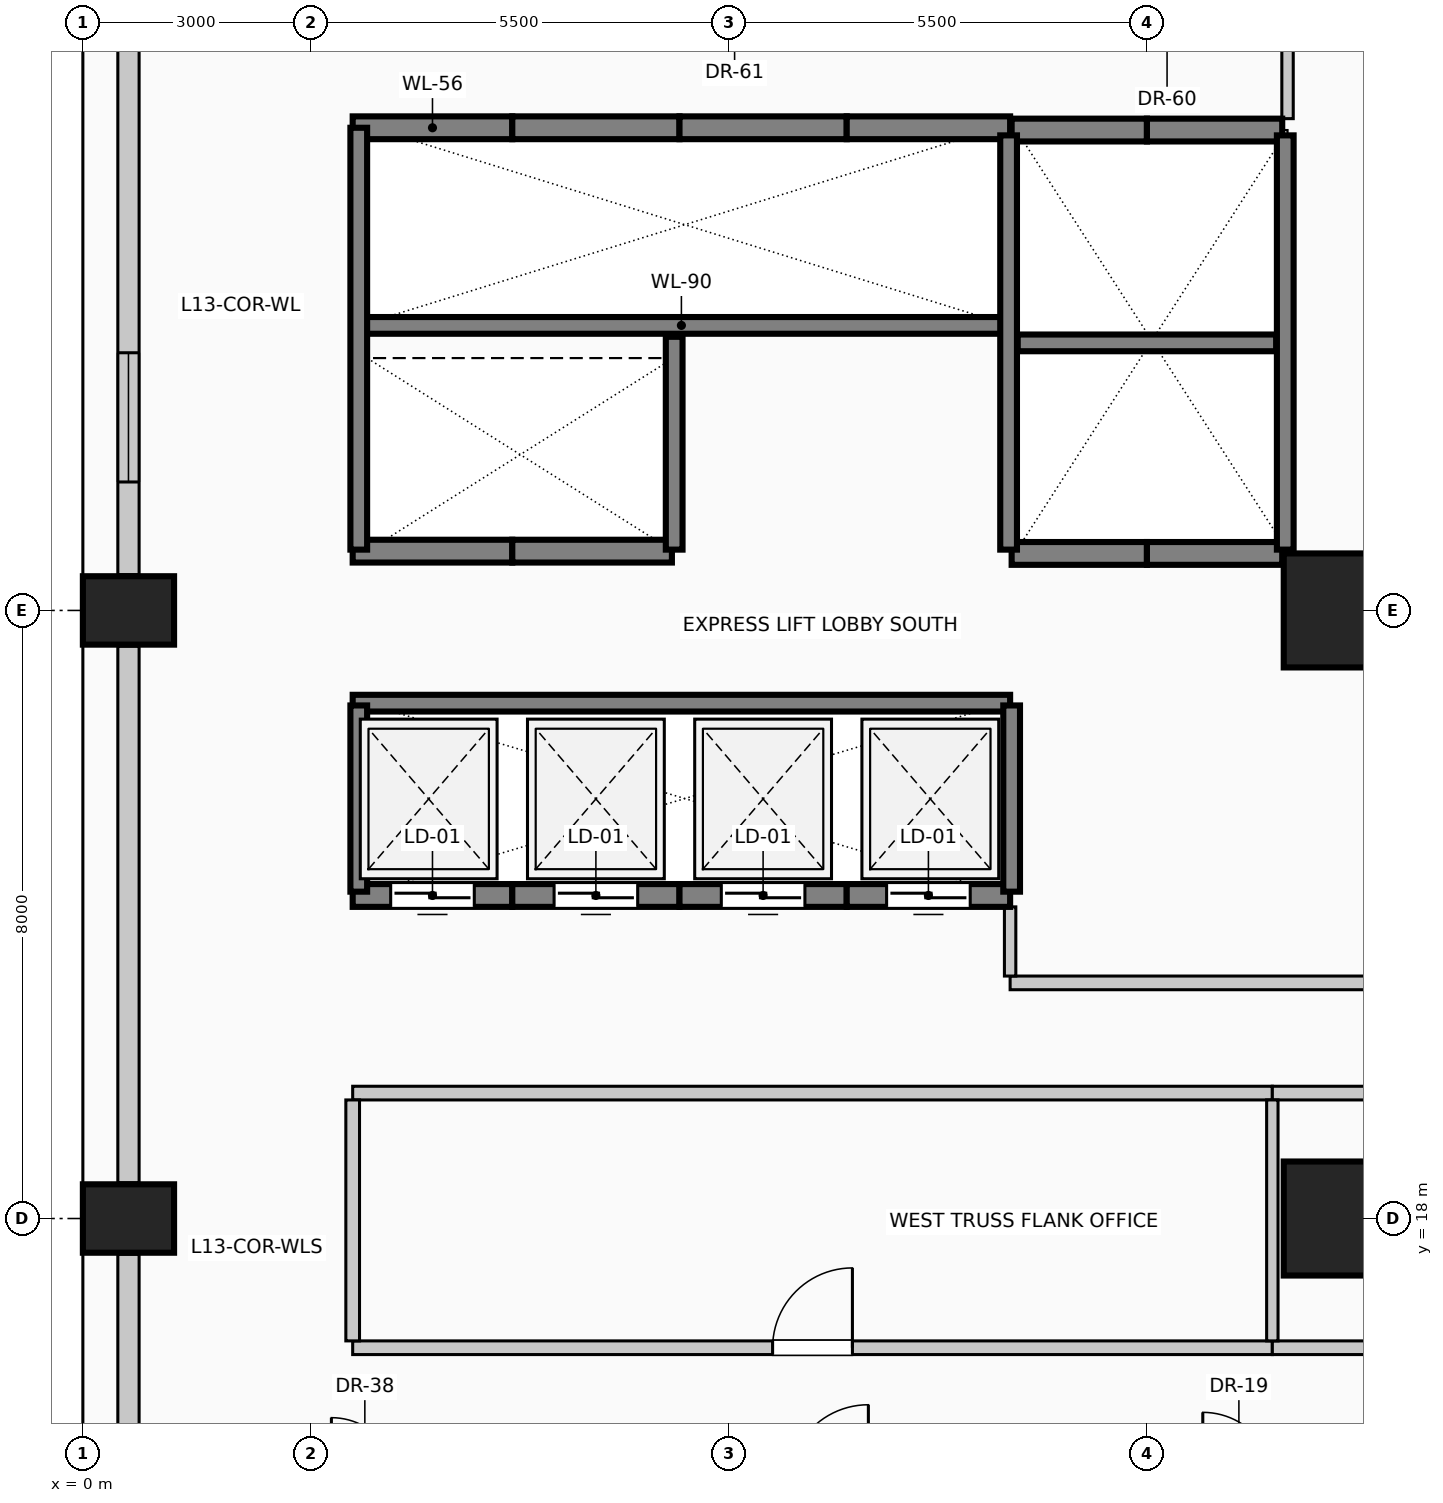
"""IFC4 building model, lengths in metres.
Left out: names, types, materials, properties, quantities, classifications, styles, units other than length and angle.
Written with IfcOpenShell. Run it as: python <this file> out.ifc"""

import sys

from ifc_helpers import new_model, si_unit, direction, frame, frame_2d, origin, origin_2d, place, context, subcontext, project, spatial, rectangle, extrude, element, fill, save


model = new_model("IFC4")
c1 = context("Model", 3, precision=1e-05, world=origin(), true_north=direction((0.0, 1.0)))
c2 = subcontext(c1, "Body", "Model", "MODEL_VIEW")
j1 = project(units=[si_unit("LENGTHUNIT", "METRE"), si_unit("PLANEANGLEUNIT", "RADIAN")], contexts=[c1])
p1 = place(None, origin())
s1 = spatial("IfcSite", under=j1, at=p1, CompositionType="ELEMENT")
p2 = place(p1, origin())
s2 = spatial("IfcBuilding", under=s1, at=p2, CompositionType="ELEMENT")
p3 = place(p2, frame((0.0, 0.0, 54.6)))
s3 = spatial("IfcBuildingStorey", under=s2, at=p3, CompositionType="ELEMENT", Elevation=54.6)
for number, where, z_axis, x_axis in (
    (1, (0.6, 18.0, 0.0), (0.0, 0.0, 1.0), (0.0, 1.0, 0.0)),
    (2, (0.6, 26.0, 0.0), (0.0, 0.0, 1.0), (0.0, 1.0, 0.0)),
):
    element("IfcColumn", number, at=place(p3, frame(where, z_axis=z_axis, x_axis=x_axis)), inside=s3, PredefinedType="COLUMN", context=c2, shape_type="SweptSolid", body=[
        extrude(rectangle(XDim=0.9, YDim=1.2, at=origin_2d()), origin(), (0.0, 0.0, 1.0), 4.0),
    ])
for number, where, z_axis, x_axis in (
    (3, (16.4, 18.0, 0.0), (0.0, 0.0, 1.0), (1.0, 0.0, 0.0)),
    (4, (16.4, 26.0, 0.0), (0.0, 0.0, 1.0), (1.0, 0.0, 0.0)),
):
    element("IfcColumn", number, at=place(p3, frame(where, z_axis=z_axis, x_axis=x_axis)), inside=s3, PredefinedType="COLUMN", context=c2, shape_type="SweptSolid", body=[
        extrude(rectangle(XDim=1.2, YDim=1.5, at=origin_2d()), origin(), (0.0, 0.0, 1.0), 4.0),
    ])
p4 = place(p3, frame((0.6, 10.47, 0.0), z_axis=(0.0, 0.0, 1.0), x_axis=(0.0, 1.0, 0.0)))
e5 = element("IfcWall", 5, at=p4, inside=s3, PredefinedType="SOLIDWALL", context=c2, shape_type="SweptSolid", body=[
    extrude(rectangle(XDim=7.06, YDim=0.28, at=frame_2d((3.53, 0.0))), origin(), (0.0, 0.0, 1.0), 2.85),
])
p5 = place(p4, frame((1.22, 0.0, 0.5)))
e6 = element("IfcOpeningElement", 6, at=p5, cuts=e5, PredefinedType="OPENING", context=c2, shape_type="SweptSolid", body=[
    extrude(rectangle(XDim=1.7, YDim=1.95, at=frame_2d((0.85, 0.975))), frame((0.0, 0.15, 0.0), z_axis=(0.0, -1.0, 0.0), x_axis=(1.0, 0.0, 0.0)), (0.0, 0.0, 1.0), 0.3),
])
p6 = place(p3, frame((0.6, 18.47, 0.0), z_axis=(0.0, 0.0, 1.0), x_axis=(0.0, 1.0, 0.0)))
e7 = element("IfcWall", 7, at=p6, inside=s3, PredefinedType="SOLIDWALL", context=c2, shape_type="SweptSolid", body=[
    extrude(rectangle(XDim=7.06, YDim=0.28, at=frame_2d((3.53, 0.0))), origin(), (0.0, 0.0, 1.0), 2.85),
])
p7 = place(p3, frame((0.6, 26.47, 0.0), z_axis=(0.0, 0.0, 1.0), x_axis=(0.0, 1.0, 0.0)))
e8 = element("IfcWall", 8, at=p7, inside=s3, PredefinedType="SOLIDWALL", context=c2, shape_type="SweptSolid", body=[
    extrude(rectangle(XDim=7.06, YDim=0.28, at=frame_2d((3.53, 0.0))), origin(), (0.0, 0.0, 1.0), 2.85),
])
p8 = place(p7, frame((1.22, 0.0, 0.5)))
e9 = element("IfcOpeningElement", 9, at=p8, cuts=e8, PredefinedType="OPENING", context=c2, shape_type="SweptSolid", body=[
    extrude(rectangle(XDim=1.7, YDim=1.95, at=frame_2d((0.85, 0.975))), frame((0.0, 0.15, 0.0), z_axis=(0.0, -1.0, 0.0), x_axis=(1.0, 0.0, 0.0)), (0.0, 0.0, 1.0), 0.3),
])
p9 = place(p3, frame((5.65, 22.25, 0.0), z_axis=(0.0, 0.0, 1.0), x_axis=(-1.0, 0.0, 0.0)))
e10 = element("IfcWall", 10, at=p9, inside=s3, PredefinedType="SOLIDWALL", context=c2, shape_type="SweptSolid", body=[
    extrude(rectangle(XDim=2.1, YDim=0.3, at=frame_2d((1.05, 0.0))), origin(), (0.0, 0.0, 1.0), 4.0),
])
p10 = place(p9, frame((0.5, 0.0, 0.0)))
e11 = element("IfcOpeningElement", 11, at=p10, cuts=e10, PredefinedType="OPENING", context=c2, shape_type="SweptSolid", body=[
    extrude(rectangle(XDim=1.1, YDim=2.2, at=frame_2d((0.55, 1.1))), frame((0.0, 0.16, 0.0), z_axis=(0.0, -1.0, 0.0), x_axis=(1.0, 0.0, 0.0)), (0.0, 0.0, 1.0), 0.32),
])
p11 = place(p3, frame((7.85, 22.25, 0.0), z_axis=(0.0, 0.0, 1.0), x_axis=(-1.0, 0.0, 0.0)))
e12 = element("IfcWall", 12, at=p11, inside=s3, PredefinedType="SOLIDWALL", context=c2, shape_type="SweptSolid", body=[
    extrude(rectangle(XDim=2.2, YDim=0.3, at=frame_2d((1.1, 0.0))), origin(), (0.0, 0.0, 1.0), 4.0),
])
p12 = place(p11, frame((0.55, 0.0, 0.0)))
e13 = element("IfcOpeningElement", 13, at=p12, cuts=e12, PredefinedType="OPENING", context=c2, shape_type="SweptSolid", body=[
    extrude(rectangle(XDim=1.1, YDim=2.2, at=frame_2d((0.55, 1.1))), frame((0.0, 0.16, 0.0), z_axis=(0.0, -1.0, 0.0), x_axis=(1.0, 0.0, 0.0)), (0.0, 0.0, 1.0), 0.32),
])
p13 = place(p3, frame((10.05, 22.25, 0.0), z_axis=(0.0, 0.0, 1.0), x_axis=(-1.0, 0.0, 0.0)))
e14 = element("IfcWall", 14, at=p13, inside=s3, PredefinedType="SOLIDWALL", context=c2, shape_type="SweptSolid", body=[
    extrude(rectangle(XDim=2.2, YDim=0.3, at=frame_2d((1.1, 0.0))), origin(), (0.0, 0.0, 1.0), 4.0),
])
p14 = place(p13, frame((0.55, 0.0, 0.0)))
e15 = element("IfcOpeningElement", 15, at=p14, cuts=e14, PredefinedType="OPENING", context=c2, shape_type="SweptSolid", body=[
    extrude(rectangle(XDim=1.1, YDim=2.2, at=frame_2d((0.55, 1.1))), frame((0.0, 0.16, 0.0), z_axis=(0.0, -1.0, 0.0), x_axis=(1.0, 0.0, 0.0)), (0.0, 0.0, 1.0), 0.32),
])
p15 = place(p3, frame((12.2, 22.25, 0.0), z_axis=(0.0, 0.0, 1.0), x_axis=(-1.0, 0.0, 0.0)))
e16 = element("IfcWall", 16, at=p15, inside=s3, PredefinedType="SOLIDWALL", context=c2, shape_type="SweptSolid", body=[
    extrude(rectangle(XDim=2.15, YDim=0.3, at=frame_2d((1.075, 0.0))), origin(), (0.0, 0.0, 1.0), 4.0),
])
p16 = place(p15, frame((0.525, 0.0, 0.0)))
e17 = element("IfcOpeningElement", 17, at=p16, cuts=e16, PredefinedType="OPENING", context=c2, shape_type="SweptSolid", body=[
    extrude(rectangle(XDim=1.1, YDim=2.2, at=frame_2d((0.55, 1.1))), frame((0.0, 0.16, 0.0), z_axis=(0.0, -1.0, 0.0), x_axis=(1.0, 0.0, 0.0)), (0.0, 0.0, 1.0), 0.32),
])
for number, where, z_axis, x_axis in (
    (18, (14.0, 26.75, 0.0), (0.0, 0.0, 1.0), (-1.0, 0.0, 0.0)),
    (19, (15.78, 26.75, 0.0), (0.0, 0.0, 1.0), (-1.0, 0.0, 0.0)),
    (20, (12.22, 32.32, 0.0), (0.0, 0.0, 1.0), (1.0, 0.0, 0.0)),
    (21, (14.0, 32.32, 0.0), (0.0, 0.0, 1.0), (1.0, 0.0, 0.0)),
):
    element("IfcWall", number, at=place(p3, frame(where, z_axis=z_axis, x_axis=x_axis)), inside=s3, PredefinedType="SOLIDWALL", context=c2, shape_type="SweptSolid", body=[
        extrude(rectangle(XDim=1.78, YDim=0.3, at=frame_2d((0.89, 0.0))), origin(), (0.0, 0.0, 1.0), 4.0),
    ])
p17 = place(p3, frame((3.55, 32.35, 0.0), z_axis=(0.0, 0.0, 1.0), x_axis=(1.0, 0.0, 0.0)))
e22 = element("IfcWall", 22, at=p17, inside=s3, PredefinedType="SOLIDWALL", context=c2, shape_type="SweptSolid", body=[
    extrude(rectangle(XDim=2.1, YDim=0.3, at=frame_2d((1.05, 0.0))), origin(), (0.0, 0.0, 1.0), 4.0),
])
p18 = place(p3, frame((5.65, 32.35, 0.0), z_axis=(0.0, 0.0, 1.0), x_axis=(1.0, 0.0, 0.0)))
e23 = element("IfcWall", 23, at=p18, inside=s3, PredefinedType="SOLIDWALL", context=c2, shape_type="SweptSolid", body=[
    extrude(rectangle(XDim=2.2, YDim=0.3, at=frame_2d((1.1, 0.0))), origin(), (0.0, 0.0, 1.0), 4.0),
])
p19 = place(p3, frame((7.85, 32.35, 0.0), z_axis=(0.0, 0.0, 1.0), x_axis=(1.0, 0.0, 0.0)))
e24 = element("IfcWall", 24, at=p19, inside=s3, PredefinedType="SOLIDWALL", context=c2, shape_type="SweptSolid", body=[
    extrude(rectangle(XDim=2.2, YDim=0.3, at=frame_2d((1.1, 0.0))), origin(), (0.0, 0.0, 1.0), 4.0),
])
p20 = place(p3, frame((10.05, 32.35, 0.0), z_axis=(0.0, 0.0, 1.0), x_axis=(1.0, 0.0, 0.0)))
e25 = element("IfcWall", 25, at=p20, inside=s3, PredefinedType="SOLIDWALL", context=c2, shape_type="SweptSolid", body=[
    extrude(rectangle(XDim=2.15, YDim=0.3, at=frame_2d((1.075, 0.0))), origin(), (0.0, 0.0, 1.0), 4.0),
])
p21 = place(p3, frame((5.65, 26.78, 0.0), z_axis=(0.0, 0.0, 1.0), x_axis=(-1.0, 0.0, 0.0)))
e26 = element("IfcWall", 26, at=p21, inside=s3, PredefinedType="SOLIDWALL", context=c2, shape_type="SweptSolid", body=[
    extrude(rectangle(XDim=2.1, YDim=0.3, at=frame_2d((1.05, 0.0))), origin(), (0.0, 0.0, 1.0), 4.0),
])
p22 = place(p3, frame((7.75, 26.78, 0.0), z_axis=(0.0, 0.0, 1.0), x_axis=(-1.0, 0.0, 0.0)))
e27 = element("IfcWall", 27, at=p22, inside=s3, PredefinedType="SOLIDWALL", context=c2, shape_type="SweptSolid", body=[
    extrude(rectangle(XDim=2.1, YDim=0.3, at=frame_2d((1.05, 0.0))), origin(), (0.0, 0.0, 1.0), 4.0),
])
p23 = place(p3, frame((3.55, 29.75, 0.0), z_axis=(0.0, 0.0, 1.0), x_axis=(1.0, 0.0, 0.0)))
e28 = element("IfcWall", 28, at=p23, inside=s3, PredefinedType="SOLIDWALL", context=c2, shape_type="SweptSolid", body=[
    extrude(rectangle(XDim=8.65, YDim=0.22, at=frame_2d((4.325, 0.0))), origin(), (0.0, 0.0, 1.0), 4.0),
])
p24 = place(p3, frame((3.63, 26.8, 0.0), z_axis=(0.0, 0.0, 1.0), x_axis=(0.0, 1.0, 0.0)))
e29 = element("IfcWall", 29, at=p24, inside=s3, PredefinedType="SOLIDWALL", context=c2, shape_type="SweptSolid", body=[
    extrude(rectangle(XDim=5.55, YDim=0.22, at=frame_2d((2.775, 0.0))), origin(), (0.0, 0.0, 1.0), 4.0),
])
p25 = place(p3, frame((7.78, 26.8, 0.0), z_axis=(0.0, 0.0, 1.0), x_axis=(0.0, 1.0, 0.0)))
e30 = element("IfcWall", 30, at=p25, inside=s3, PredefinedType="SOLIDWALL", context=c2, shape_type="SweptSolid", body=[
    extrude(rectangle(XDim=2.8, YDim=0.22, at=frame_2d((1.4, 0.0))), origin(), (0.0, 0.0, 1.0), 4.0),
])
for number, where, z_axis, x_axis in (
    (31, (12.18, 26.8, 0.0), (0.0, 0.0, 1.0), (0.0, 1.0, 0.0)),
    (32, (15.82, 26.8, 0.0), (0.0, 0.0, 1.0), (0.0, 1.0, 0.0)),
):
    element("IfcWall", number, at=place(p3, frame(where, z_axis=z_axis, x_axis=x_axis)), inside=s3, PredefinedType="SOLIDWALL", context=c2, shape_type="SweptSolid", body=[
        extrude(rectangle(XDim=5.45, YDim=0.22, at=frame_2d((2.725, 0.0))), origin(), (0.0, 0.0, 1.0), 4.0),
    ])
p26 = place(p3, frame((12.3, 29.52, 0.0), z_axis=(0.0, 0.0, 1.0), x_axis=(1.0, 0.0, 0.0)))
e33 = element("IfcWall", 33, at=p26, inside=s3, PredefinedType="SOLIDWALL", context=c2, shape_type="SweptSolid", body=[
    extrude(rectangle(XDim=3.4, YDim=0.22, at=frame_2d((1.7, 0.0))), origin(), (0.0, 0.0, 1.0), 4.0),
])
p27 = place(p3, frame((3.55, 24.78, 0.0), z_axis=(0.0, 0.0, 1.0), x_axis=(1.0, 0.0, 0.0)))
e34 = element("IfcWall", 34, at=p27, inside=s3, PredefinedType="SOLIDWALL", context=c2, shape_type="SweptSolid", body=[
    extrude(rectangle(XDim=8.65, YDim=0.22, at=frame_2d((4.325, 0.0))), origin(), (0.0, 0.0, 1.0), 4.0),
])
for number, where, z_axis, x_axis in (
    (35, (3.63, 22.3, 0.0), (0.0, 0.0, 1.0), (0.0, 1.0, 0.0)),
    (36, (12.22, 22.3, 0.0), (0.0, 0.0, 1.0), (0.0, 1.0, 0.0)),
):
    element("IfcWall", number, at=place(p3, frame(where, z_axis=z_axis, x_axis=x_axis)), inside=s3, PredefinedType="SOLIDWALL", context=c2, shape_type="SweptSolid", body=[
        extrude(rectangle(XDim=2.45, YDim=0.22, at=frame_2d((1.225, 0.0))), origin(), (0.0, 0.0, 1.0), 4.0),
    ])
p28 = place(p3, frame((3.55, 16.3, 0.0), z_axis=(0.0, 0.0, 1.0), x_axis=(1.0, 0.0, 0.0)))
e37 = element("IfcWall", 37, at=p28, inside=s3, PredefinedType="PARTITIONING", context=c2, shape_type="SweptSolid", body=[
    extrude(rectangle(XDim=12.1, YDim=0.18, at=frame_2d((6.05, 0.0))), origin(), (0.0, 0.0, 1.0), 3.7),
])
p29 = place(p28, frame((5.525, 0.0, 0.0)))
e38 = element("IfcOpeningElement", 38, at=p29, cuts=e37, PredefinedType="OPENING", context=c2, shape_type="SweptSolid", body=[
    extrude(rectangle(XDim=1.05, YDim=2.15, at=frame_2d((0.525, 1.075))), frame((0.0, 0.1, 0.0), z_axis=(0.0, -1.0, 0.0), x_axis=(1.0, 0.0, 0.0)), (0.0, 0.0, 1.0), 0.2),
])
p30 = place(p3, frame((15.65, 16.3, 0.0), z_axis=(0.0, 0.0, 1.0), x_axis=(1.0, 0.0, 0.0)))
e39 = element("IfcWall", 39, at=p30, inside=s3, PredefinedType="PARTITIONING", context=c2, shape_type="SweptSolid", body=[
    extrude(rectangle(XDim=26.7, YDim=0.18, at=frame_2d((13.35, 0.0))), origin(), (0.0, 0.0, 1.0), 3.7),
])
p31 = place(p3, frame((3.55, 19.65, 0.0), z_axis=(0.0, 0.0, 1.0), x_axis=(1.0, 0.0, 0.0)))
e40 = element("IfcWall", 40, at=p31, inside=s3, PredefinedType="PARTITIONING", context=c2, shape_type="SweptSolid", body=[
    extrude(rectangle(XDim=12.1, YDim=0.18, at=frame_2d((6.05, 0.0))), origin(), (0.0, 0.0, 1.0), 3.7),
])
p32 = place(p3, frame((15.65, 19.65, 0.0), z_axis=(0.0, 0.0, 1.0), x_axis=(1.0, 0.0, 0.0)))
e41 = element("IfcWall", 41, at=p32, inside=s3, PredefinedType="PARTITIONING", context=c2, shape_type="SweptSolid", body=[
    extrude(rectangle(XDim=26.7, YDim=0.18, at=frame_2d((13.35, 0.0))), origin(), (0.0, 0.0, 1.0), 3.7),
])
p33 = place(p3, frame((12.2, 21.1, 0.0), z_axis=(0.0, 0.0, 1.0), x_axis=(1.0, 0.0, 0.0)))
e42 = element("IfcWall", 42, at=p33, inside=s3, PredefinedType="PARTITIONING", context=c2, shape_type="SweptSolid", body=[
    extrude(rectangle(XDim=6.0, YDim=0.18, at=frame_2d((3.0, 0.0))), origin(), (0.0, 0.0, 1.0), 3.7),
])
p34 = place(p3, frame((3.55, 16.39, 0.0), z_axis=(0.0, 0.0, 1.0), x_axis=(0.0, 1.0, 0.0)))
e43 = element("IfcWall", 43, at=p34, inside=s3, PredefinedType="PARTITIONING", context=c2, shape_type="SweptSolid", body=[
    extrude(rectangle(XDim=3.17, YDim=0.18, at=frame_2d((1.585, 0.0))), origin(), (0.0, 0.0, 1.0), 3.7),
])
p35 = place(p3, frame((12.2, 21.19, 0.0), z_axis=(0.0, 0.0, 1.0), x_axis=(0.0, 1.0, 0.0)))
e44 = element("IfcWall", 44, at=p35, inside=s3, PredefinedType="PARTITIONING", context=c2, shape_type="SweptSolid", body=[
    extrude(rectangle(XDim=0.91, YDim=0.15, at=frame_2d((0.455, 0.0))), origin(), (0.0, 0.0, 1.0), 3.7),
])
p36 = place(p3, frame((15.65, 16.39, 0.0), z_axis=(0.0, 0.0, 1.0), x_axis=(0.0, 1.0, 0.0)))
e45 = element("IfcWall", 45, at=p36, inside=s3, PredefinedType="PARTITIONING", context=c2, shape_type="SweptSolid", body=[
    extrude(rectangle(XDim=3.17, YDim=0.15, at=frame_2d((1.585, 0.0))), origin(), (0.0, 0.0, 1.0), 3.7),
])
p37 = place(p3, frame((15.85, 32.47, 0.0), z_axis=(0.0, 0.0, 1.0), x_axis=(0.0, 1.0, 0.0)))
e46 = element("IfcWall", 46, at=p37, inside=s3, PredefinedType="PARTITIONING", context=c2, shape_type="SweptSolid", body=[
    extrude(rectangle(XDim=1.03, YDim=0.15, at=frame_2d((0.515, 0.0))), origin(), (0.0, 0.0, 1.0), 3.7),
])
p38 = place(p8, origin())
e47 = element("IfcWindow", 47, at=p38, inside=s3, PartitioningType="SINGLE_PANEL", PredefinedType="WINDOW", context=c2, shape_type="SweptSolid", body=[
    extrude(rectangle(XDim=1.7, YDim=1.95, at=frame_2d((0.85, 0.975))), frame((0.0, 0.03, 0.0), z_axis=(0.0, -1.0, 0.0), x_axis=(1.0, 0.0, 0.0)), (0.0, 0.0, 1.0), 0.06),
])
fill(e9, e47)
p39 = place(p10, origin())
e48 = element("IfcDoor", 48, at=p39, inside=s3, OperationType="SLIDING_TO_LEFT", PredefinedType="DOOR", context=c2, shape_type="SweptSolid", body=[
    extrude(rectangle(XDim=1.1, YDim=2.2, at=frame_2d((0.55, 1.1))), frame((0.0, 0.025, 0.0), z_axis=(0.0, -1.0, 0.0), x_axis=(1.0, 0.0, 0.0)), (0.0, 0.0, 1.0), 0.05),
])
fill(e11, e48)
p40 = place(p12, origin())
e49 = element("IfcDoor", 49, at=p40, inside=s3, OperationType="SLIDING_TO_RIGHT", PredefinedType="DOOR", context=c2, shape_type="SweptSolid", body=[
    extrude(rectangle(XDim=1.1, YDim=2.2, at=frame_2d((0.55, 1.1))), frame((0.0, 0.025, 0.0), z_axis=(0.0, -1.0, 0.0), x_axis=(1.0, 0.0, 0.0)), (0.0, 0.0, 1.0), 0.05),
])
fill(e13, e49)
p41 = place(p14, origin())
e50 = element("IfcDoor", 50, at=p41, inside=s3, OperationType="SLIDING_TO_LEFT", PredefinedType="DOOR", context=c2, shape_type="SweptSolid", body=[
    extrude(rectangle(XDim=1.1, YDim=2.2, at=frame_2d((0.55, 1.1))), frame((0.0, 0.025, 0.0), z_axis=(0.0, -1.0, 0.0), x_axis=(1.0, 0.0, 0.0)), (0.0, 0.0, 1.0), 0.05),
])
fill(e15, e50)
p42 = place(p16, origin())
e51 = element("IfcDoor", 51, at=p42, inside=s3, OperationType="SLIDING_TO_RIGHT", PredefinedType="DOOR", context=c2, shape_type="SweptSolid", body=[
    extrude(rectangle(XDim=1.1, YDim=2.2, at=frame_2d((0.55, 1.1))), frame((0.0, 0.025, 0.0), z_axis=(0.0, -1.0, 0.0), x_axis=(1.0, 0.0, 0.0)), (0.0, 0.0, 1.0), 0.05),
])
fill(e17, e51)
p43 = place(p29, origin())
e52 = element("IfcDoor", 52, at=p43, inside=s3, OperationType="SINGLE_SWING_RIGHT", PredefinedType="DOOR", context=c2, shape_type="SweptSolid", body=[
    extrude(rectangle(XDim=1.05, YDim=2.15, at=frame_2d((0.525, 1.075))), frame((0.0, 0.025, 0.0), z_axis=(0.0, -1.0, 0.0), x_axis=(1.0, 0.0, 0.0)), (0.0, 0.0, 1.0), 0.05),
])
fill(e38, e52)
save(model, sys.argv[1])
